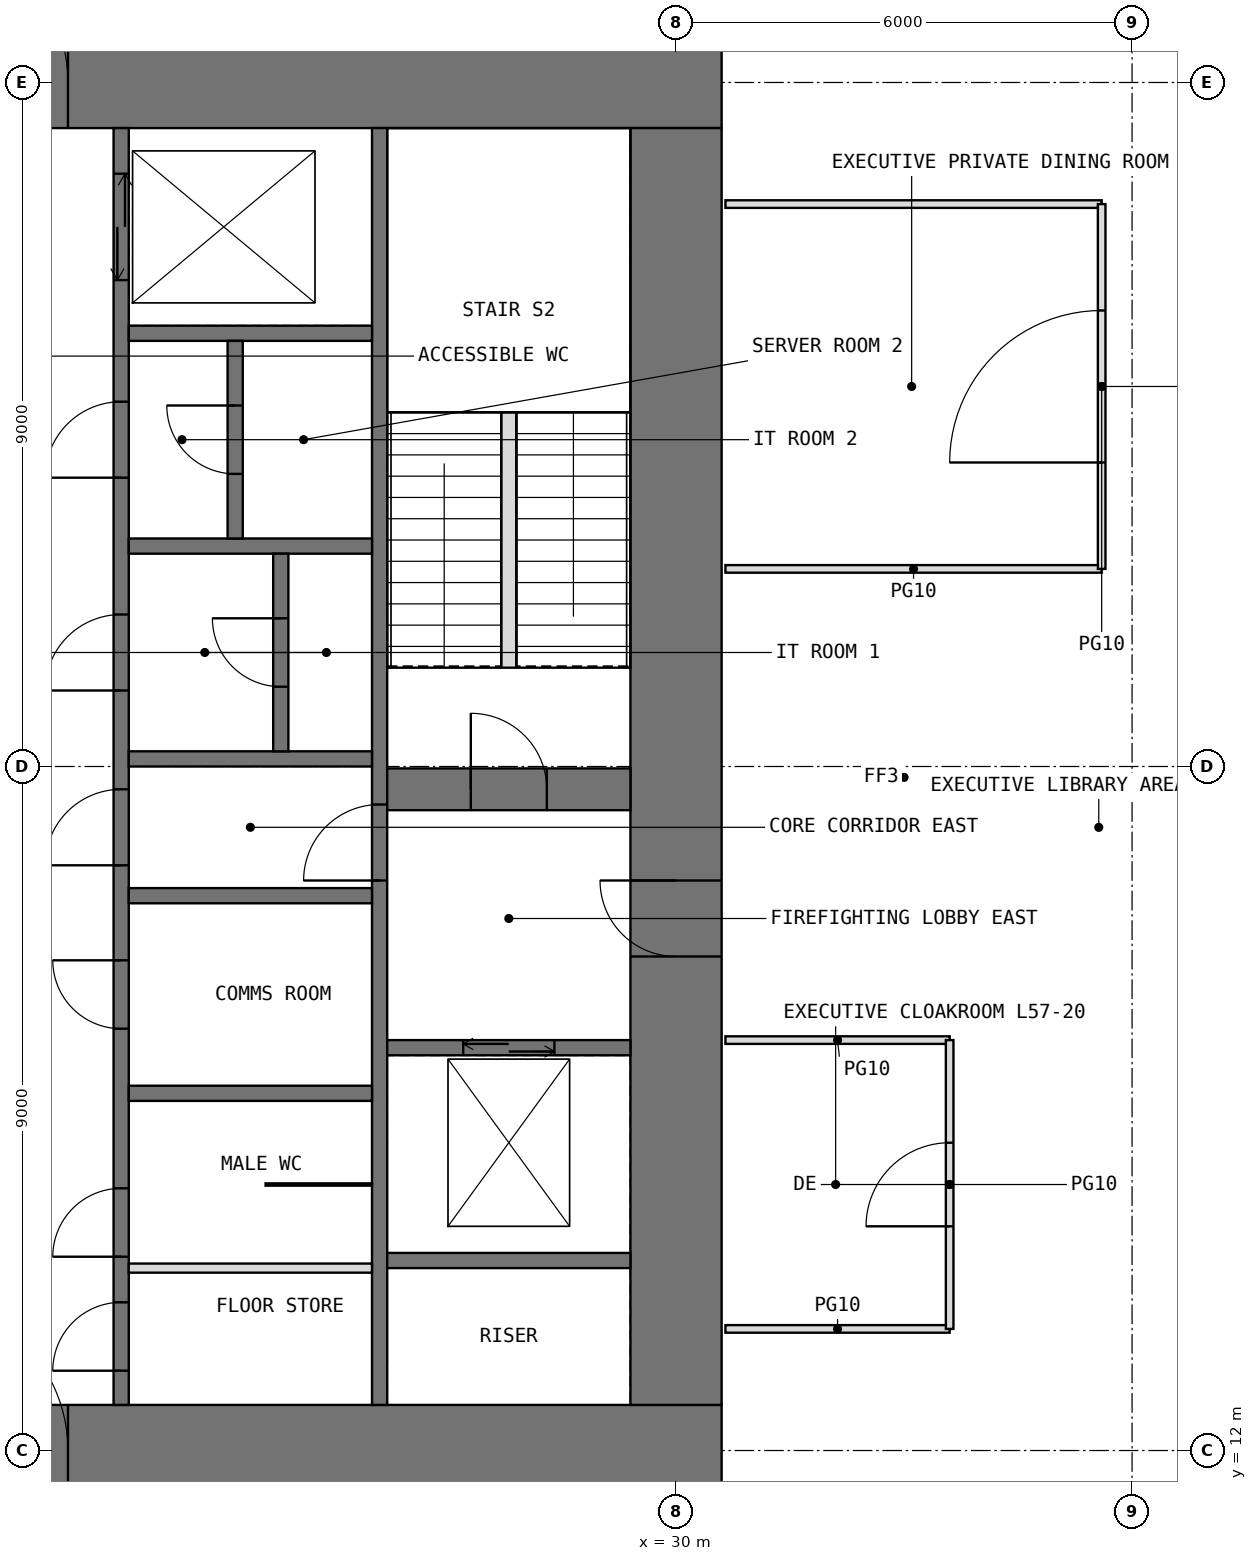
"""IFC4 building model, lengths in metres.
Left out: names, types, materials, properties, quantities, classifications, styles, units other than length and angle.
Written with IfcOpenShell. Run it as: python <this file> out.ifc"""

import sys

from ifc_helpers import new_model, si_unit, direction, frame, frame_2d, origin, place, context, subcontext, project, spatial, rectangle, extrude, element, fill, save


model = new_model("IFC4")
c1 = context("Model", 3, precision=1e-05, world=origin(), true_north=direction((0.0, 1.0)))
c2 = subcontext(c1, "Body", "Model", "MODEL_VIEW")
j1 = project(units=[si_unit("LENGTHUNIT", "METRE"), si_unit("PLANEANGLEUNIT", "RADIAN")], contexts=[c1])
p1 = place(None, origin())
s1 = spatial("IfcSite", under=j1, at=p1, CompositionType="ELEMENT")
p2 = place(p1, origin())
s2 = spatial("IfcBuilding", under=s1, at=p2, CompositionType="ELEMENT")
p3 = place(p2, frame((0.0, 0.0, 239.5)))
s3 = spatial("IfcBuildingStorey", under=s2, at=p3, CompositionType="ELEMENT", Elevation=239.5)
p4 = place(p3, frame((11.4, 12.0, -0.05), z_axis=(0.0, 0.0, 1.0), x_axis=(1.0, 0.0, 0.0)))
e1 = element("IfcWall", 1, at=p4, inside=s3, PredefinedType="SHEAR", context=c2, shape_type="SweptSolid", body=[
    extrude(rectangle(XDim=19.2, YDim=1.2, at=frame_2d((9.6, 0.0))), origin(), (0.0, 0.0, 1.0), 4.5),
])
p5 = place(p4, frame((8.6, 0.0, 0.05)))
e2 = element("IfcOpeningElement", 2, at=p5, cuts=e1, PredefinedType="OPENING", context=c2, shape_type="SweptSolid", body=[
    extrude(rectangle(XDim=2.0, YDim=2.2, at=frame_2d((1.0, 1.1))), frame((0.0, 0.61, 0.0), z_axis=(0.0, -1.0, 0.0), x_axis=(1.0, 0.0, 0.0)), (0.0, 0.0, 1.0), 1.22),
])
p6 = place(p3, frame((11.4, 30.0, -0.05), z_axis=(0.0, 0.0, 1.0), x_axis=(1.0, 0.0, 0.0)))
e3 = element("IfcWall", 3, at=p6, inside=s3, PredefinedType="SHEAR", context=c2, shape_type="SweptSolid", body=[
    extrude(rectangle(XDim=19.2, YDim=1.2, at=frame_2d((9.6, 0.0))), origin(), (0.0, 0.0, 1.0), 4.5),
])
p7 = place(p6, frame((8.6, 0.0, 0.05)))
e4 = element("IfcOpeningElement", 4, at=p7, cuts=e3, PredefinedType="OPENING", context=c2, shape_type="SweptSolid", body=[
    extrude(rectangle(XDim=2.0, YDim=2.2, at=frame_2d((1.0, 1.1))), frame((0.0, 0.61, 0.0), z_axis=(0.0, -1.0, 0.0), x_axis=(1.0, 0.0, 0.0)), (0.0, 0.0, 1.0), 1.22),
])
p8 = place(p3, frame((30.0, 12.6, -0.05), z_axis=(0.0, 0.0, 1.0), x_axis=(0.0, 1.0, 0.0)))
e5 = element("IfcWall", 5, at=p8, inside=s3, PredefinedType="SHEAR", context=c2, shape_type="SweptSolid", body=[
    extrude(rectangle(XDim=16.8, YDim=1.2, at=frame_2d((8.4, 0.0))), origin(), (0.0, 0.0, 1.0), 4.5),
])
p9 = place(p8, frame((5.9, 0.0, 0.05)))
e6 = element("IfcOpeningElement", 6, at=p9, cuts=e5, PredefinedType="OPENING", context=c2, shape_type="SweptSolid", body=[
    extrude(rectangle(XDim=1.0, YDim=2.2, at=frame_2d((0.5, 1.1))), frame((0.0, 0.61, 0.0), z_axis=(0.0, -1.0, 0.0), x_axis=(1.0, 0.0, 0.0)), (0.0, 0.0, 1.0), 1.22),
])
p10 = place(p3, frame((22.7, 12.6, -0.05), z_axis=(0.0, 0.0, 1.0), x_axis=(0.0, 1.0, 0.0)))
e7 = element("IfcWall", 7, at=p10, inside=s3, PredefinedType="SHEAR", context=c2, shape_type="SweptSolid", body=[
    extrude(rectangle(XDim=16.8, YDim=0.2, at=frame_2d((8.4, 0.0))), origin(), (0.0, 0.0, 1.0), 4.5),
])
p11 = place(p10, frame((0.45, 0.0, 0.05)))
e8 = element("IfcOpeningElement", 8, at=p11, cuts=e7, PredefinedType="OPENING", context=c2, shape_type="SweptSolid", body=[
    extrude(rectangle(XDim=0.9, YDim=2.2, at=frame_2d((0.45, 1.1))), frame((0.0, 0.11, 0.0), z_axis=(0.0, -1.0, 0.0), x_axis=(1.0, 0.0, 0.0)), (0.0, 0.0, 1.0), 0.22),
])
p12 = place(p10, frame((7.1, 0.0, 0.05)))
e9 = element("IfcOpeningElement", 9, at=p12, cuts=e7, PredefinedType="OPENING", context=c2, shape_type="SweptSolid", body=[
    extrude(rectangle(XDim=1.0, YDim=2.2, at=frame_2d((0.5, 1.1))), frame((0.0, 0.11, 0.0), z_axis=(0.0, -1.0, 0.0), x_axis=(1.0, 0.0, 0.0)), (0.0, 0.0, 1.0), 0.22),
])
p13 = place(p10, frame((1.95, 0.0, 0.05)))
e10 = element("IfcOpeningElement", 10, at=p13, cuts=e7, PredefinedType="OPENING", context=c2, shape_type="SweptSolid", body=[
    extrude(rectangle(XDim=0.9, YDim=2.2, at=frame_2d((0.45, 1.1))), frame((0.0, 0.11, 0.0), z_axis=(0.0, -1.0, 0.0), x_axis=(1.0, 0.0, 0.0)), (0.0, 0.0, 1.0), 0.22),
])
p14 = place(p10, frame((4.95, 0.0, 0.05)))
e11 = element("IfcOpeningElement", 11, at=p14, cuts=e7, PredefinedType="OPENING", context=c2, shape_type="SweptSolid", body=[
    extrude(rectangle(XDim=0.9, YDim=2.2, at=frame_2d((0.45, 1.1))), frame((0.0, 0.11, 0.0), z_axis=(0.0, -1.0, 0.0), x_axis=(1.0, 0.0, 0.0)), (0.0, 0.0, 1.0), 0.22),
])
p15 = place(p10, frame((9.4, 0.0, 0.05)))
e12 = element("IfcOpeningElement", 12, at=p15, cuts=e7, PredefinedType="OPENING", context=c2, shape_type="SweptSolid", body=[
    extrude(rectangle(XDim=1.0, YDim=2.2, at=frame_2d((0.5, 1.1))), frame((0.0, 0.11, 0.0), z_axis=(0.0, -1.0, 0.0), x_axis=(1.0, 0.0, 0.0)), (0.0, 0.0, 1.0), 0.22),
])
p16 = place(p10, frame((12.2, 0.0, 0.05)))
e13 = element("IfcOpeningElement", 13, at=p16, cuts=e7, PredefinedType="OPENING", context=c2, shape_type="SweptSolid", body=[
    extrude(rectangle(XDim=1.0, YDim=2.2, at=frame_2d((0.5, 1.1))), frame((0.0, 0.11, 0.0), z_axis=(0.0, -1.0, 0.0), x_axis=(1.0, 0.0, 0.0)), (0.0, 0.0, 1.0), 0.22),
])
p17 = place(p10, frame((14.8, 0.0, 0.05)))
e14 = element("IfcOpeningElement", 14, at=p17, cuts=e7, PredefinedType="OPENING", context=c2, shape_type="SweptSolid", body=[
    extrude(rectangle(XDim=1.4, YDim=2.4, at=frame_2d((0.7, 1.2))), frame((0.0, 0.11, 0.0), z_axis=(0.0, -1.0, 0.0), x_axis=(1.0, 0.0, 0.0)), (0.0, 0.0, 1.0), 0.22),
])
p18 = place(p3, frame((26.1, 12.6, -0.05), z_axis=(0.0, 0.0, 1.0), x_axis=(0.0, 1.0, 0.0)))
e15 = element("IfcWall", 15, at=p18, inside=s3, PredefinedType="SHEAR", context=c2, shape_type="SweptSolid", body=[
    extrude(rectangle(XDim=16.8, YDim=0.2, at=frame_2d((8.4, 0.0))), origin(), (0.0, 0.0, 1.0), 4.5),
])
p19 = place(p18, frame((6.9, 0.0, 0.05)))
e16 = element("IfcOpeningElement", 16, at=p19, cuts=e15, PredefinedType="OPENING", context=c2, shape_type="SweptSolid", body=[
    extrude(rectangle(XDim=1.0, YDim=2.2, at=frame_2d((0.5, 1.1))), frame((0.0, 0.11, 0.0), z_axis=(0.0, -1.0, 0.0), x_axis=(1.0, 0.0, 0.0)), (0.0, 0.0, 1.0), 0.22),
])
for number, where, z_axis, x_axis in (
    (17, (22.8, 16.7, -0.05), (0.0, 0.0, 1.0), (1.0, 0.0, 0.0)),
    (18, (22.8, 19.3, -0.05), (0.0, 0.0, 1.0), (1.0, 0.0, 0.0)),
    (19, (22.8, 21.1, -0.05), (0.0, 0.0, 1.0), (1.0, 0.0, 0.0)),
    (20, (22.8, 23.9, -0.05), (0.0, 0.0, 1.0), (1.0, 0.0, 0.0)),
    (21, (22.8, 26.7, -0.05), (0.0, 0.0, 1.0), (1.0, 0.0, 0.0)),
    (22, (26.2, 14.5, -0.05), (0.0, 0.0, 1.0), (1.0, 0.0, 0.0)),
):
    element("IfcWall", number, at=place(p3, frame(where, z_axis=z_axis, x_axis=x_axis)), inside=s3, PredefinedType="SHEAR", context=c2, shape_type="SweptSolid", body=[
        extrude(rectangle(XDim=3.2, YDim=0.2, at=frame_2d((1.6, 0.0))), origin(), (0.0, 0.0, 1.0), 4.5),
    ])
p20 = place(p3, frame((26.2, 17.3, -0.05), z_axis=(0.0, 0.0, 1.0), x_axis=(1.0, 0.0, 0.0)))
e23 = element("IfcWall", 23, at=p20, inside=s3, PredefinedType="SHEAR", context=c2, shape_type="SweptSolid", body=[
    extrude(rectangle(XDim=3.2, YDim=0.2, at=frame_2d((1.6, 0.0))), origin(), (0.0, 0.0, 1.0), 4.5),
])
p21 = place(p20, frame((1.0, 0.0, 0.05)))
e24 = element("IfcOpeningElement", 24, at=p21, cuts=e23, PredefinedType="OPENING", context=c2, shape_type="SweptSolid", body=[
    extrude(rectangle(XDim=1.2, YDim=2.2, at=frame_2d((0.6, 1.1))), frame((0.0, 0.11, 0.0), z_axis=(0.0, -1.0, 0.0), x_axis=(1.0, 0.0, 0.0)), (0.0, 0.0, 1.0), 0.22),
])
p22 = place(p3, frame((26.2, 20.7, -0.05), z_axis=(0.0, 0.0, 1.0), x_axis=(1.0, 0.0, 0.0)))
e25 = element("IfcWall", 25, at=p22, inside=s3, PredefinedType="SHEAR", context=c2, shape_type="SweptSolid", body=[
    extrude(rectangle(XDim=3.2, YDim=0.55, at=frame_2d((1.6, 0.0))), origin(), (0.0, 0.0, 1.0), 4.5),
])
p23 = place(p22, frame((1.1, 0.0, 0.05)))
e26 = element("IfcOpeningElement", 26, at=p23, cuts=e25, PredefinedType="OPENING", context=c2, shape_type="SweptSolid", body=[
    extrude(rectangle(XDim=1.0, YDim=2.2, at=frame_2d((0.5, 1.1))), frame((0.0, 0.285, 0.0), z_axis=(0.0, -1.0, 0.0), x_axis=(1.0, 0.0, 0.0)), (0.0, 0.0, 1.0), 0.57),
])
p24 = place(p3, frame((22.8, 14.4, 0.0), z_axis=(0.0, 0.0, 1.0), x_axis=(1.0, 0.0, 0.0)))
e27 = element("IfcWall", 27, at=p24, inside=s3, PredefinedType="PARTITIONING", context=c2, shape_type="SweptSolid", body=[
    extrude(rectangle(XDim=3.2, YDim=0.12, at=frame_2d((1.6, 0.0))), origin(), (0.0, 0.0, 1.0), 4.25),
])
p25 = place(p3, frame((24.6, 15.5, 0.0), z_axis=(0.0, 0.0, 1.0), x_axis=(1.0, 0.0, 0.0)))
e28 = element("IfcWall", 28, at=p25, inside=s3, PredefinedType="PARTITIONING", context=c2, shape_type="SweptSolid", body=[
    extrude(rectangle(XDim=1.4, YDim=0.03, at=frame_2d((0.7, 0.0))), origin(), (0.0, 0.0, 1.0), 4.25),
])
p26 = place(p3, frame((24.8, 21.2, -0.05), z_axis=(0.0, 0.0, 1.0), x_axis=(0.0, 1.0, 0.0)))
e29 = element("IfcWall", 29, at=p26, inside=s3, PredefinedType="SHEAR", context=c2, shape_type="SweptSolid", body=[
    extrude(rectangle(XDim=2.6, YDim=0.2, at=frame_2d((1.3, 0.0))), origin(), (0.0, 0.0, 1.0), 4.5),
])
p27 = place(p26, frame((0.85, 0.0, 0.05)))
e30 = element("IfcOpeningElement", 30, at=p27, cuts=e29, PredefinedType="OPENING", context=c2, shape_type="SweptSolid", body=[
    extrude(rectangle(XDim=0.9, YDim=2.2, at=frame_2d((0.45, 1.1))), frame((0.0, 0.11, 0.0), z_axis=(0.0, -1.0, 0.0), x_axis=(1.0, 0.0, 0.0)), (0.0, 0.0, 1.0), 0.22),
])
p28 = place(p3, frame((24.2, 24.0, -0.05), z_axis=(0.0, 0.0, 1.0), x_axis=(0.0, 1.0, 0.0)))
e31 = element("IfcWall", 31, at=p28, inside=s3, PredefinedType="SHEAR", context=c2, shape_type="SweptSolid", body=[
    extrude(rectangle(XDim=2.6, YDim=0.2, at=frame_2d((1.3, 0.0))), origin(), (0.0, 0.0, 1.0), 4.5),
])
p29 = place(p28, frame((0.85, 0.0, 0.05)))
e32 = element("IfcOpeningElement", 32, at=p29, cuts=e31, PredefinedType="OPENING", context=c2, shape_type="SweptSolid", body=[
    extrude(rectangle(XDim=0.9, YDim=2.2, at=frame_2d((0.45, 1.1))), frame((0.0, 0.11, 0.0), z_axis=(0.0, -1.0, 0.0), x_axis=(1.0, 0.0, 0.0)), (0.0, 0.0, 1.0), 0.22),
])
for number, where, z_axis, x_axis in (
    (33, (30.65, 13.6, 0.0), (0.0, 0.0, 1.0), (1.0, 0.0, 0.0)),
    (34, (30.65, 17.4, 0.0), (0.0, 0.0, 1.0), (1.0, 0.0, 0.0)),
):
    element("IfcWall", number, at=place(p3, frame(where, z_axis=z_axis, x_axis=x_axis)), inside=s3, PredefinedType="PARTITIONING", context=c2, shape_type="SweptSolid", body=[
        extrude(rectangle(XDim=2.95, YDim=0.1, at=frame_2d((1.475, 0.0))), origin(), (0.0, 0.0, 1.0), 4.25),
    ])
for number, where, z_axis, x_axis in (
    (35, (30.65, 23.6, 0.0), (0.0, 0.0, 1.0), (1.0, 0.0, 0.0)),
    (36, (30.65, 28.4, 0.0), (0.0, 0.0, 1.0), (1.0, 0.0, 0.0)),
):
    element("IfcWall", number, at=place(p3, frame(where, z_axis=z_axis, x_axis=x_axis)), inside=s3, PredefinedType="PARTITIONING", context=c2, shape_type="SweptSolid", body=[
        extrude(rectangle(XDim=4.95, YDim=0.1, at=frame_2d((2.475, 0.0))), origin(), (0.0, 0.0, 1.0), 4.25),
    ])
p30 = place(p3, frame((33.6, 13.6, 0.0), z_axis=(0.0, 0.0, 1.0), x_axis=(0.0, 1.0, 0.0)))
e37 = element("IfcWall", 37, at=p30, inside=s3, PredefinedType="PARTITIONING", context=c2, shape_type="SweptSolid", body=[
    extrude(rectangle(XDim=3.8, YDim=0.1, at=frame_2d((1.9, 0.0))), origin(), (0.0, 0.0, 1.0), 4.25),
])
p31 = place(p30, frame((1.35, 0.0, 0.0)))
e38 = element("IfcOpeningElement", 38, at=p31, cuts=e37, PredefinedType="OPENING", context=c2, shape_type="SweptSolid", body=[
    extrude(rectangle(XDim=1.1, YDim=2.3, at=frame_2d((0.55, 1.15))), frame((0.0, 0.06, 0.0), z_axis=(0.0, -1.0, 0.0), x_axis=(1.0, 0.0, 0.0)), (0.0, 0.0, 1.0), 0.12),
])
p32 = place(p3, frame((35.6, 23.6, 0.0), z_axis=(0.0, 0.0, 1.0), x_axis=(0.0, 1.0, 0.0)))
e39 = element("IfcWall", 39, at=p32, inside=s3, PredefinedType="PARTITIONING", context=c2, shape_type="SweptSolid", body=[
    extrude(rectangle(XDim=4.8, YDim=0.1, at=frame_2d((2.4, 0.0))), origin(), (0.0, 0.0, 1.0), 4.25),
])
p33 = place(p32, frame((1.4, 0.0, 0.0)))
e40 = element("IfcOpeningElement", 40, at=p33, cuts=e39, PredefinedType="OPENING", context=c2, shape_type="SweptSolid", body=[
    extrude(rectangle(XDim=2.0, YDim=2.4, at=frame_2d((1.0, 1.2))), frame((0.0, 0.06, 0.0), z_axis=(0.0, -1.0, 0.0), x_axis=(1.0, 0.0, 0.0)), (0.0, 0.0, 1.0), 0.12),
])
p34 = place(p3, frame((27.8, 22.3, 0.0), z_axis=(0.0, 0.0, 1.0), x_axis=(0.0, 1.0, 0.0)))
e41 = element("IfcWall", 41, at=p34, inside=s3, PredefinedType="PARTITIONING", context=c2, shape_type="SweptSolid", body=[
    extrude(rectangle(XDim=3.36, YDim=0.2, at=frame_2d((1.68, 0.0))), origin(), (0.0, 0.0, 1.0), 4.5),
])
p35 = place(p5, origin())
e42 = element("IfcDoor", 42, at=p35, inside=s3, OperationType="DOUBLE_DOOR_SINGLE_SWING", PredefinedType="DOOR", context=c2, shape_type="SweptSolid", body=[
    extrude(rectangle(XDim=2.0, YDim=2.2, at=frame_2d((1.0, 1.1))), frame((0.0, 0.025, 0.0), z_axis=(0.0, -1.0, 0.0), x_axis=(1.0, 0.0, 0.0)), (0.0, 0.0, 1.0), 0.05),
])
fill(e2, e42)
p36 = place(p7, origin())
e43 = element("IfcDoor", 43, at=p36, inside=s3, OperationType="DOUBLE_DOOR_SINGLE_SWING", PredefinedType="DOOR", context=c2, shape_type="SweptSolid", body=[
    extrude(rectangle(XDim=2.0, YDim=2.2, at=frame_2d((1.0, 1.1))), frame((0.0, 0.025, 0.0), z_axis=(0.0, -1.0, 0.0), x_axis=(1.0, 0.0, 0.0)), (0.0, 0.0, 1.0), 0.05),
])
fill(e4, e43)
p37 = place(p11, origin())
e44 = element("IfcDoor", 44, at=p37, inside=s3, OperationType="SINGLE_SWING_LEFT", PredefinedType="DOOR", context=c2, shape_type="SweptSolid", body=[
    extrude(rectangle(XDim=0.9, YDim=2.2, at=frame_2d((0.45, 1.1))), frame((0.0, 0.025, 0.0), z_axis=(0.0, -1.0, 0.0), x_axis=(1.0, 0.0, 0.0)), (0.0, 0.0, 1.0), 0.05),
])
fill(e8, e44)
p38 = place(p9, origin())
e45 = element("IfcDoor", 45, at=p38, inside=s3, OperationType="SINGLE_SWING_RIGHT", PredefinedType="DOOR", context=c2, shape_type="SweptSolid", body=[
    extrude(rectangle(XDim=1.0, YDim=2.2, at=frame_2d((0.5, 1.1))), frame((0.0, 0.025, 0.0), z_axis=(0.0, -1.0, 0.0), x_axis=(1.0, 0.0, 0.0)), (0.0, 0.0, 1.0), 0.05),
])
fill(e6, e45)
p39 = place(p23, origin())
e46 = element("IfcDoor", 46, at=p39, inside=s3, OperationType="SINGLE_SWING_LEFT", PredefinedType="DOOR", context=c2, shape_type="SweptSolid", body=[
    extrude(rectangle(XDim=1.0, YDim=2.2, at=frame_2d((0.5, 1.1))), frame((0.0, 0.025, 0.0), z_axis=(0.0, -1.0, 0.0), x_axis=(1.0, 0.0, 0.0)), (0.0, 0.0, 1.0), 0.05),
])
fill(e26, e46)
p40 = place(p19, origin())
e47 = element("IfcDoor", 47, at=p40, inside=s3, OperationType="SINGLE_SWING_LEFT", PredefinedType="DOOR", context=c2, shape_type="SweptSolid", body=[
    extrude(rectangle(XDim=1.0, YDim=2.2, at=frame_2d((0.5, 1.1))), frame((0.0, 0.025, 0.0), z_axis=(0.0, -1.0, 0.0), x_axis=(1.0, 0.0, 0.0)), (0.0, 0.0, 1.0), 0.05),
])
fill(e16, e47)
p41 = place(p12, origin())
e48 = element("IfcDoor", 48, at=p41, inside=s3, OperationType="SINGLE_SWING_LEFT", PredefinedType="DOOR", context=c2, shape_type="SweptSolid", body=[
    extrude(rectangle(XDim=1.0, YDim=2.2, at=frame_2d((0.5, 1.1))), frame((0.0, 0.025, 0.0), z_axis=(0.0, -1.0, 0.0), x_axis=(1.0, 0.0, 0.0)), (0.0, 0.0, 1.0), 0.05),
])
fill(e9, e48)
p42 = place(p13, origin())
e49 = element("IfcDoor", 49, at=p42, inside=s3, OperationType="SINGLE_SWING_LEFT", PredefinedType="DOOR", context=c2, shape_type="SweptSolid", body=[
    extrude(rectangle(XDim=0.9, YDim=2.2, at=frame_2d((0.45, 1.1))), frame((0.0, 0.025, 0.0), z_axis=(0.0, -1.0, 0.0), x_axis=(1.0, 0.0, 0.0)), (0.0, 0.0, 1.0), 0.05),
])
fill(e10, e49)
p43 = place(p14, origin())
e50 = element("IfcDoor", 50, at=p43, inside=s3, OperationType="SINGLE_SWING_RIGHT", PredefinedType="DOOR", context=c2, shape_type="SweptSolid", body=[
    extrude(rectangle(XDim=0.9, YDim=2.2, at=frame_2d((0.45, 1.1))), frame((0.0, 0.025, 0.0), z_axis=(0.0, -1.0, 0.0), x_axis=(1.0, 0.0, 0.0)), (0.0, 0.0, 1.0), 0.05),
])
fill(e11, e50)
p44 = place(p15, origin())
e51 = element("IfcDoor", 51, at=p44, inside=s3, OperationType="SINGLE_SWING_LEFT", PredefinedType="DOOR", context=c2, shape_type="SweptSolid", body=[
    extrude(rectangle(XDim=1.0, YDim=2.2, at=frame_2d((0.5, 1.1))), frame((0.0, 0.025, 0.0), z_axis=(0.0, -1.0, 0.0), x_axis=(1.0, 0.0, 0.0)), (0.0, 0.0, 1.0), 0.05),
])
fill(e12, e51)
p45 = place(p27, origin())
e52 = element("IfcDoor", 52, at=p45, inside=s3, OperationType="SINGLE_SWING_RIGHT", PredefinedType="DOOR", context=c2, shape_type="SweptSolid", body=[
    extrude(rectangle(XDim=0.9, YDim=2.2, at=frame_2d((0.45, 1.1))), frame((0.0, 0.025, 0.0), z_axis=(0.0, -1.0, 0.0), x_axis=(1.0, 0.0, 0.0)), (0.0, 0.0, 1.0), 0.05),
])
fill(e30, e52)
p46 = place(p16, origin())
e53 = element("IfcDoor", 53, at=p46, inside=s3, OperationType="SINGLE_SWING_LEFT", PredefinedType="DOOR", context=c2, shape_type="SweptSolid", body=[
    extrude(rectangle(XDim=1.0, YDim=2.2, at=frame_2d((0.5, 1.1))), frame((0.0, 0.025, 0.0), z_axis=(0.0, -1.0, 0.0), x_axis=(1.0, 0.0, 0.0)), (0.0, 0.0, 1.0), 0.05),
])
fill(e13, e53)
p47 = place(p29, origin())
e54 = element("IfcDoor", 54, at=p47, inside=s3, OperationType="SINGLE_SWING_RIGHT", PredefinedType="DOOR", context=c2, shape_type="SweptSolid", body=[
    extrude(rectangle(XDim=0.9, YDim=2.2, at=frame_2d((0.45, 1.1))), frame((0.0, 0.025, 0.0), z_axis=(0.0, -1.0, 0.0), x_axis=(1.0, 0.0, 0.0)), (0.0, 0.0, 1.0), 0.05),
])
fill(e32, e54)
p48 = place(p31, origin())
e55 = element("IfcDoor", 55, at=p48, inside=s3, OperationType="SINGLE_SWING_LEFT", PredefinedType="DOOR", context=c2, shape_type="SweptSolid", body=[
    extrude(rectangle(XDim=1.1, YDim=2.3, at=frame_2d((0.55, 1.15))), frame((0.0, 0.025, 0.0), z_axis=(0.0, -1.0, 0.0), x_axis=(1.0, 0.0, 0.0)), (0.0, 0.0, 1.0), 0.05),
])
fill(e38, e55)
p49 = place(p33, origin())
e56 = element("IfcDoor", 56, at=p49, inside=s3, OperationType="DOUBLE_DOOR_SINGLE_SWING", PredefinedType="DOOR", context=c2, shape_type="SweptSolid", body=[
    extrude(rectangle(XDim=2.0, YDim=2.4, at=frame_2d((1.0, 1.2))), frame((0.0, 0.025, 0.0), z_axis=(0.0, -1.0, 0.0), x_axis=(1.0, 0.0, 0.0)), (0.0, 0.0, 1.0), 0.05),
])
fill(e40, e56)
p50 = place(p17, origin())
e57 = element("IfcDoor", 57, at=p50, inside=s3, OperationType="DOUBLE_DOOR_SLIDING", PredefinedType="DOOR", context=c2, shape_type="SweptSolid", body=[
    extrude(rectangle(XDim=1.4, YDim=2.4, at=frame_2d((0.7, 1.2))), frame((0.0, 0.025, 0.0), z_axis=(0.0, -1.0, 0.0), x_axis=(1.0, 0.0, 0.0)), (0.0, 0.0, 1.0), 0.05),
])
fill(e14, e57)
p51 = place(p21, origin())
e58 = element("IfcDoor", 58, at=p51, inside=s3, OperationType="DOUBLE_DOOR_SLIDING", PredefinedType="DOOR", context=c2, shape_type="SweptSolid", body=[
    extrude(rectangle(XDim=1.2, YDim=2.2, at=frame_2d((0.6, 1.1))), frame((0.0, 0.025, 0.0), z_axis=(0.0, -1.0, 0.0), x_axis=(1.0, 0.0, 0.0)), (0.0, 0.0, 1.0), 0.05),
])
fill(e24, e58)
save(model, sys.argv[1])
